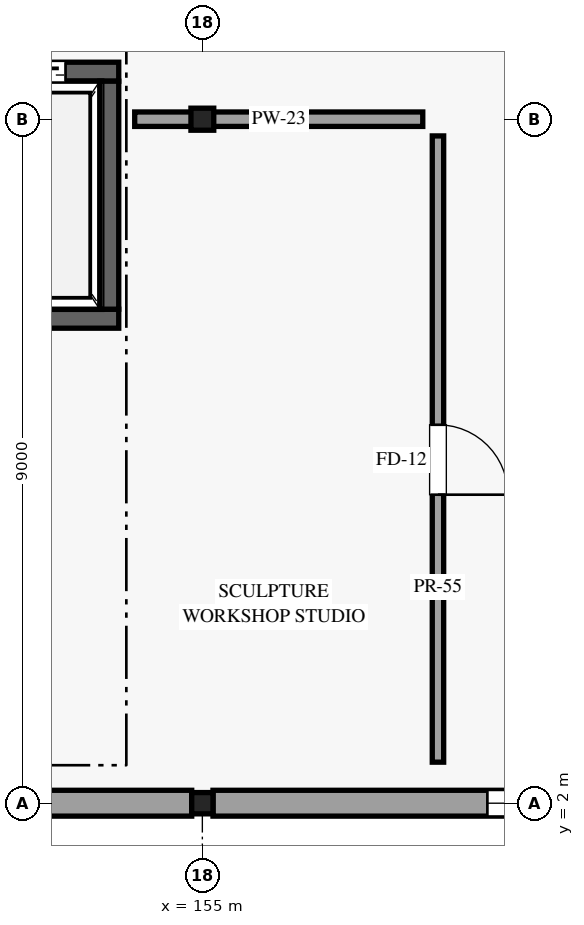
"""IFC4 building model, lengths in metres.
Left out: names, types, materials, properties, quantities, classifications, styles, units other than length and angle.
Written with IfcOpenShell. Run it as: python <this file> out.ifc"""

import sys

from ifc_helpers import new_model, si_unit, direction, frame, frame_2d, origin, origin_2d, place, context, subcontext, project, spatial, rectangle, i_section, extrude, element, fill, save


model = new_model("IFC4")
c1 = context("Model", 3, precision=1e-05, world=origin(), true_north=direction((0.0, 1.0)))
c2 = subcontext(c1, "Body", "Model", "MODEL_VIEW")
j1 = project(units=[si_unit("LENGTHUNIT", "METRE"), si_unit("PLANEANGLEUNIT", "RADIAN")], contexts=[c1])
p1 = place(None, origin())
s1 = spatial("IfcSite", under=j1, at=p1, CompositionType="ELEMENT")
p2 = place(p1, origin())
s2 = spatial("IfcBuilding", under=s1, at=p2, CompositionType="ELEMENT")
p3 = place(p2, frame((0.0, 0.0, 10.2)))
s3 = spatial("IfcBuildingStorey", under=s2, at=p3, CompositionType="ELEMENT", Elevation=10.2)
p4 = place(p3, frame((155.0, 2.0, 0.0), z_axis=(0.0, 0.0, 1.0), x_axis=(1.0, 0.0, 0.0)))
e1 = element("IfcColumn", 1, at=p4, inside=s3, PredefinedType="COLUMN", context=c2, shape_type="SweptSolid", body=[
    extrude(i_section(OverallWidth=0.28, OverallDepth=0.28, WebThickness=0.01, FlangeThickness=0.018, FilletRadius=0.024, at=origin_2d()), origin(), (0.0, 0.0, 1.0), 4.8),
])
p5 = place(p3, frame((155.0, 11.0, 0.0), z_axis=(0.0, 0.0, 1.0), x_axis=(1.0, 0.0, 0.0)))
e2 = element("IfcColumn", 2, at=p5, inside=s3, PredefinedType="COLUMN", context=c2, shape_type="SweptSolid", body=[
    extrude(i_section(OverallWidth=0.3, OverallDepth=0.29, WebThickness=0.009, FlangeThickness=0.014, FilletRadius=0.027, at=origin_2d()), origin(), (0.0, 0.0, 1.0), 4.8),
])
p6 = place(p3, frame((146.14, 2.0, 0.0), z_axis=(0.0, 0.0, 1.0), x_axis=(1.0, 0.0, 0.0)))
e3 = element("IfcWall", 3, at=p6, inside=s3, PredefinedType="STANDARD", context=c2, shape_type="SweptSolid", body=[
    extrude(rectangle(XDim=8.72, YDim=0.34, at=frame_2d((4.36, 0.0))), origin(), (0.0, 0.0, 1.0), 4.115),
])
p7 = place(p6, frame((5.985, 0.0, 0.85), z_axis=(0.0, 0.0, 1.0), x_axis=(-1.0, 0.0, 0.0)))
e4 = element("IfcOpeningElement", 4, at=p7, cuts=e3, PredefinedType="OPENING", context=c2, shape_type="SweptSolid", body=[
    extrude(rectangle(XDim=3.25, YDim=2.6, at=frame_2d((1.625, 1.3))), frame((0.0, 0.18, 0.0), z_axis=(0.0, -1.0, 0.0), x_axis=(1.0, 0.0, 0.0)), (0.0, 0.0, 1.0), 0.36),
])
p8 = place(p3, frame((155.14, 2.0, 0.0), z_axis=(0.0, 0.0, 1.0), x_axis=(1.0, 0.0, 0.0)))
e5 = element("IfcWall", 5, at=p8, inside=s3, PredefinedType="STANDARD", context=c2, shape_type="SweptSolid", body=[
    extrude(rectangle(XDim=8.72, YDim=0.34, at=frame_2d((4.36, 0.0))), origin(), (0.0, 0.0, 1.0), 4.115),
])
p9 = place(p8, frame((5.11, 0.0, 0.85), z_axis=(0.0, 0.0, 1.0), x_axis=(-1.0, 0.0, 0.0)))
e6 = element("IfcOpeningElement", 6, at=p9, cuts=e5, PredefinedType="OPENING", context=c2, shape_type="SweptSolid", body=[
    extrude(rectangle(XDim=1.5, YDim=2.2, at=frame_2d((0.75, 1.1))), frame((0.0, 0.18, 0.0), z_axis=(0.0, -1.0, 0.0), x_axis=(1.0, 0.0, 0.0)), (0.0, 0.0, 1.0), 0.36),
])
p10 = place(p3, frame((151.4, 11.625, 0.0), z_axis=(0.0, 0.0, 1.0), x_axis=(1.0, 0.0, 0.0)))
e7 = element("IfcWall", 7, at=p10, inside=s3, PredefinedType="SHEAR", context=c2, shape_type="SweptSolid", body=[
    extrude(rectangle(XDim=2.5, YDim=0.25, at=frame_2d((1.25, 0.0))), origin(), (0.0, 0.0, 1.0), 4.56),
])
p11 = place(p10, frame((0.7, 0.0, 0.0)))
e8 = element("IfcOpeningElement", 8, at=p11, cuts=e7, PredefinedType="OPENING", context=c2, shape_type="SweptSolid", body=[
    extrude(rectangle(XDim=1.1, YDim=2.2, at=frame_2d((0.55, 1.1))), frame((0.0, 0.135, 0.0), z_axis=(0.0, -1.0, 0.0), x_axis=(1.0, 0.0, 0.0)), (0.0, 0.0, 1.0), 0.27),
])
p12 = place(p3, frame((151.4, 8.375, 0.0), z_axis=(0.0, 0.0, 1.0), x_axis=(1.0, 0.0, 0.0)))
e9 = element("IfcWall", 9, at=p12, inside=s3, PredefinedType="SHEAR", context=c2, shape_type="SweptSolid", body=[
    extrude(rectangle(XDim=2.5, YDim=0.25, at=frame_2d((1.25, 0.0))), origin(), (0.0, 0.0, 1.0), 4.56),
])
p13 = place(p3, frame((153.775, 8.5, 0.0), z_axis=(0.0, 0.0, 1.0), x_axis=(0.0, 1.0, 0.0)))
e10 = element("IfcWall", 10, at=p13, inside=s3, PredefinedType="SHEAR", context=c2, shape_type="SweptSolid", body=[
    extrude(rectangle(XDim=3.0, YDim=0.25, at=frame_2d((1.5, 0.0))), origin(), (0.0, 0.0, 1.0), 4.56),
])
p14 = place(p3, frame((158.1, 2.54, 0.0), z_axis=(0.0, 0.0, 1.0), x_axis=(0.0, 1.0, 0.0)))
e11 = element("IfcWall", 11, at=p14, inside=s3, PredefinedType="PARTITIONING", context=c2, shape_type="SweptSolid", body=[
    extrude(rectangle(XDim=8.24, YDim=0.15, at=frame_2d((4.12, 0.0))), origin(), (0.0, 0.0, 1.0), 4.115),
])
p15 = place(p14, frame((4.439, 0.0, 0.0), z_axis=(0.0, 0.0, 1.0), x_axis=(-1.0, 0.0, 0.0)))
e12 = element("IfcOpeningElement", 12, at=p15, cuts=e11, PredefinedType="OPENING", context=c2, shape_type="SweptSolid", body=[
    extrude(rectangle(XDim=0.92, YDim=2.12, at=frame_2d((0.46, 1.06))), frame((0.0, 0.085, 0.0), z_axis=(0.0, -1.0, 0.0), x_axis=(1.0, 0.0, 0.0)), (0.0, 0.0, 1.0), 0.17),
])
p16 = place(p3, frame((154.11, 11.0, 0.0), z_axis=(0.0, 0.0, 1.0), x_axis=(1.0, 0.0, 0.0)))
e13 = element("IfcWall", 13, at=p16, inside=s3, PredefinedType="PARTITIONING", context=c2, shape_type="SweptSolid", body=[
    extrude(rectangle(XDim=3.79, YDim=0.19, at=frame_2d((1.895, 0.0))), origin(), (0.0, 0.0, 1.0), 4.115),
])
p17 = place(p9, origin())
e14 = element("IfcWindow", 14, at=p17, inside=s3, PartitioningType="SINGLE_PANEL", PredefinedType="WINDOW", context=c2, shape_type="SweptSolid", body=[
    extrude(rectangle(XDim=1.5, YDim=2.2, at=frame_2d((0.75, 1.1))), frame((0.0, 0.03, 0.0), z_axis=(0.0, -1.0, 0.0), x_axis=(1.0, 0.0, 0.0)), (0.0, 0.0, 1.0), 0.06),
])
fill(e6, e14)
p18 = place(p11, origin())
e15 = element("IfcDoor", 15, at=p18, inside=s3, OperationType="SLIDING_TO_LEFT", PredefinedType="DOOR", context=c2, shape_type="SweptSolid", body=[
    extrude(rectangle(XDim=1.1, YDim=2.2, at=frame_2d((0.55, 1.1))), frame((0.0, 0.025, 0.0), z_axis=(0.0, -1.0, 0.0), x_axis=(1.0, 0.0, 0.0)), (0.0, 0.0, 1.0), 0.05),
])
fill(e8, e15)
p19 = place(p15, origin())
e16 = element("IfcDoor", 16, at=p19, inside=s3, OperationType="SINGLE_SWING_RIGHT", PredefinedType="DOOR", context=c2, shape_type="SweptSolid", body=[
    extrude(rectangle(XDim=0.92, YDim=2.12, at=frame_2d((0.46, 1.06))), frame((0.0, 0.025, 0.0), z_axis=(0.0, -1.0, 0.0), x_axis=(1.0, 0.0, 0.0)), (0.0, 0.0, 1.0), 0.05),
])
fill(e12, e16)
save(model, sys.argv[1])
